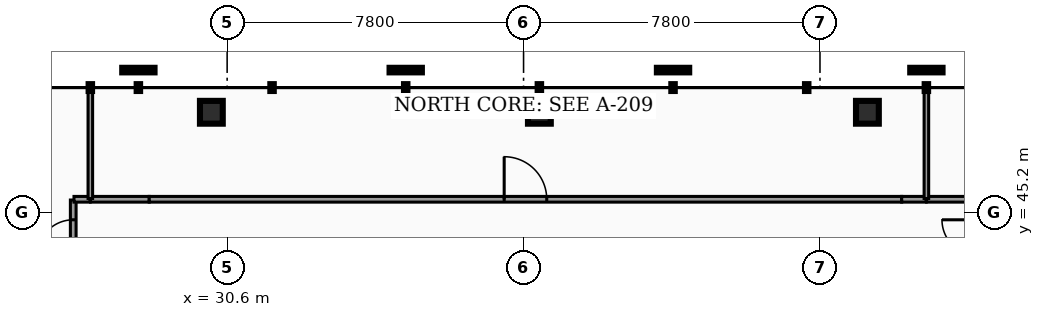
"""IFC4 building model, lengths in metres.
Left out: names, types, materials, properties, quantities, classifications, styles, units other than length and angle.
Written with IfcOpenShell. Run it as: python <this file> out.ifc"""

import sys

from ifc_helpers import new_model, si_unit, direction, frame, frame_2d, origin, origin_2d, place, context, subcontext, project, spatial, rectangle, hollow_rectangle, extrude, element, fill, save


model = new_model("IFC4")
c1 = context("Model", 3, precision=1e-05, world=origin(), true_north=direction((0.0, 1.0)))
c2 = subcontext(c1, "Body", "Model", "MODEL_VIEW")
j1 = project(units=[si_unit("LENGTHUNIT", "METRE"), si_unit("PLANEANGLEUNIT", "RADIAN")], contexts=[c1])
p1 = place(None, origin())
s1 = spatial("IfcSite", under=j1, at=p1, CompositionType="ELEMENT")
p2 = place(p1, origin())
s2 = spatial("IfcBuilding", under=s1, at=p2, CompositionType="ELEMENT")
p3 = place(p2, frame((0.0, 0.0, 199.92)))
s3 = spatial("IfcBuildingStorey", under=s2, at=p3, CompositionType="ELEMENT", Elevation=199.92)
for number, where, z_axis, x_axis in (
    (1, (47.448, 47.839, 0.0), (0.0, 0.0, 1.0), (1.0, 0.0, 0.0)),
    (2, (38.816, 47.839, 0.0), (0.0, 0.0, 1.0), (1.0, 0.0, 0.0)),
    (3, (30.185, 47.839, 0.0), (0.0, 0.0, 1.0), (1.0, 0.0, 0.0)),
):
    element("IfcColumn", number, at=place(p3, frame(where, z_axis=z_axis, x_axis=x_axis)), inside=s3, PredefinedType="COLUMN", context=c2, shape_type="SweptSolid", body=[
        extrude(hollow_rectangle(XDim=0.6, YDim=0.6, WallThickness=0.03, at=origin_2d()), origin(), (0.0, 0.0, 1.0), 4.12),
    ])
p4 = place(p3, frame((26.55, 43.55, 0.0), z_axis=(0.0, 0.0, 1.0), x_axis=(0.0, 1.0, 0.0)))
e4 = element("IfcWall", 4, at=p4, inside=s3, PredefinedType="PARTITIONING", context=c2, shape_type="SweptSolid", body=[
    extrude(rectangle(XDim=1.98, YDim=0.15, at=frame_2d((0.99, 0.0))), origin(), (0.0, 0.0, 1.0), 3.077),
])
p5 = place(p4, frame((0.52, 0.0, 0.0)))
e5 = element("IfcOpeningElement", 5, at=p5, cuts=e4, PredefinedType="OPENING", context=c2, shape_type="SweptSolid", body=[
    extrude(rectangle(XDim=0.94, YDim=2.05, at=frame_2d((0.47, 1.025))), frame((0.0, 0.085, 0.0), z_axis=(0.0, -1.0, 0.0), x_axis=(1.0, 0.0, 0.0)), (0.0, 0.0, 1.0), 0.17),
])
p6 = place(p3, frame((26.57, 45.55, 0.0), z_axis=(0.0, 0.0, 1.0), x_axis=(1.0, 0.0, 0.0)))
e6 = element("IfcWall", 6, at=p6, inside=s3, PredefinedType="PARTITIONING", context=c2, shape_type="SweptSolid", body=[
    extrude(rectangle(XDim=0.425, YDim=0.15, at=frame_2d((0.212, 0.0))), origin(), (0.0, 0.0, 1.0), 3.077),
])
p7 = place(p3, frame((49.005, 45.55, 0.0), z_axis=(0.0, 0.0, 1.0), x_axis=(1.0, 0.0, 0.0)))
e7 = element("IfcWall", 7, at=p7, inside=s3, PredefinedType="PARTITIONING", context=c2, shape_type="SweptSolid", body=[
    extrude(rectangle(XDim=1.325, YDim=0.15, at=frame_2d((0.663, 0.0))), origin(), (0.0, 0.0, 1.0), 3.077),
])
p8 = place(p3, frame((27.005, 45.55, 0.0), z_axis=(0.0, 0.0, 1.0), x_axis=(1.0, 0.0, 0.0)))
e8 = element("IfcWall", 8, at=p8, inside=s3, PredefinedType="PARTITIONING", context=c2, shape_type="SweptSolid", body=[
    extrude(rectangle(XDim=1.545, YDim=0.15, at=frame_2d((0.772, 0.0))), origin(), (0.0, 0.0, 1.0), 3.077),
])
p9 = place(p3, frame((28.55, 45.55, 0.0), z_axis=(0.0, 0.0, 1.0), x_axis=(1.0, 0.0, 0.0)))
e9 = element("IfcWall", 9, at=p9, inside=s3, PredefinedType="PARTITIONING", context=c2, shape_type="SweptSolid", body=[
    extrude(rectangle(XDim=19.8, YDim=0.15, at=frame_2d((9.9, 0.0))), origin(), (0.0, 0.0, 1.0), 3.077),
])
p10 = place(p9, frame((9.34, 0.0, 0.0)))
e10 = element("IfcOpeningElement", 10, at=p10, cuts=e9, PredefinedType="OPENING", context=c2, shape_type="SweptSolid", body=[
    extrude(rectangle(XDim=1.12, YDim=2.05, at=frame_2d((0.56, 1.025))), frame((0.0, 0.085, 0.0), z_axis=(0.0, -1.0, 0.0), x_axis=(1.0, 0.0, 0.0)), (0.0, 0.0, 1.0), 0.17),
])
p11 = place(p3, frame((48.35, 45.55, 0.0), z_axis=(0.0, 0.0, 1.0), x_axis=(1.0, 0.0, 0.0)))
e11 = element("IfcWall", 11, at=p11, inside=s3, PredefinedType="PARTITIONING", context=c2, shape_type="SweptSolid", body=[
    extrude(rectangle(XDim=0.645, YDim=0.15, at=frame_2d((0.323, 0.0))), origin(), (0.0, 0.0, 1.0), 3.077),
])
for number, where, z_axis, x_axis in (
    (12, (27.0, 45.57, 0.0), (0.0, 0.0, 1.0), (0.0, 1.0, 0.0)),
    (13, (49.0, 45.57, 0.0), (0.0, 0.0, 1.0), (0.0, 1.0, 0.0)),
):
    element("IfcWall", number, at=place(p3, frame(where, z_axis=z_axis, x_axis=x_axis)), inside=s3, PredefinedType="PARTITIONING", context=c2, shape_type="SweptSolid", body=[
        extrude(rectangle(XDim=2.904, YDim=0.12, at=frame_2d((1.452, 0.0))), origin(), (0.0, 0.0, 1.0), 3.077),
    ])
p12 = place(p5, origin())
e14 = element("IfcDoor", 14, at=p12, inside=s3, OperationType="SINGLE_SWING_LEFT", PredefinedType="DOOR", context=c2, shape_type="SweptSolid", body=[
    extrude(rectangle(XDim=0.94, YDim=2.05, at=frame_2d((0.47, 1.025))), frame((0.0, 0.025, 0.0), z_axis=(0.0, -1.0, 0.0), x_axis=(1.0, 0.0, 0.0)), (0.0, 0.0, 1.0), 0.05),
])
fill(e5, e14)
p13 = place(p10, origin())
e15 = element("IfcDoor", 15, at=p13, inside=s3, OperationType="SINGLE_SWING_LEFT", PredefinedType="DOOR", context=c2, shape_type="SweptSolid", body=[
    extrude(rectangle(XDim=1.12, YDim=2.05, at=frame_2d((0.56, 1.025))), frame((0.0, 0.025, 0.0), z_axis=(0.0, -1.0, 0.0), x_axis=(1.0, 0.0, 0.0)), (0.0, 0.0, 1.0), 0.05),
])
fill(e10, e15)
save(model, sys.argv[1])
